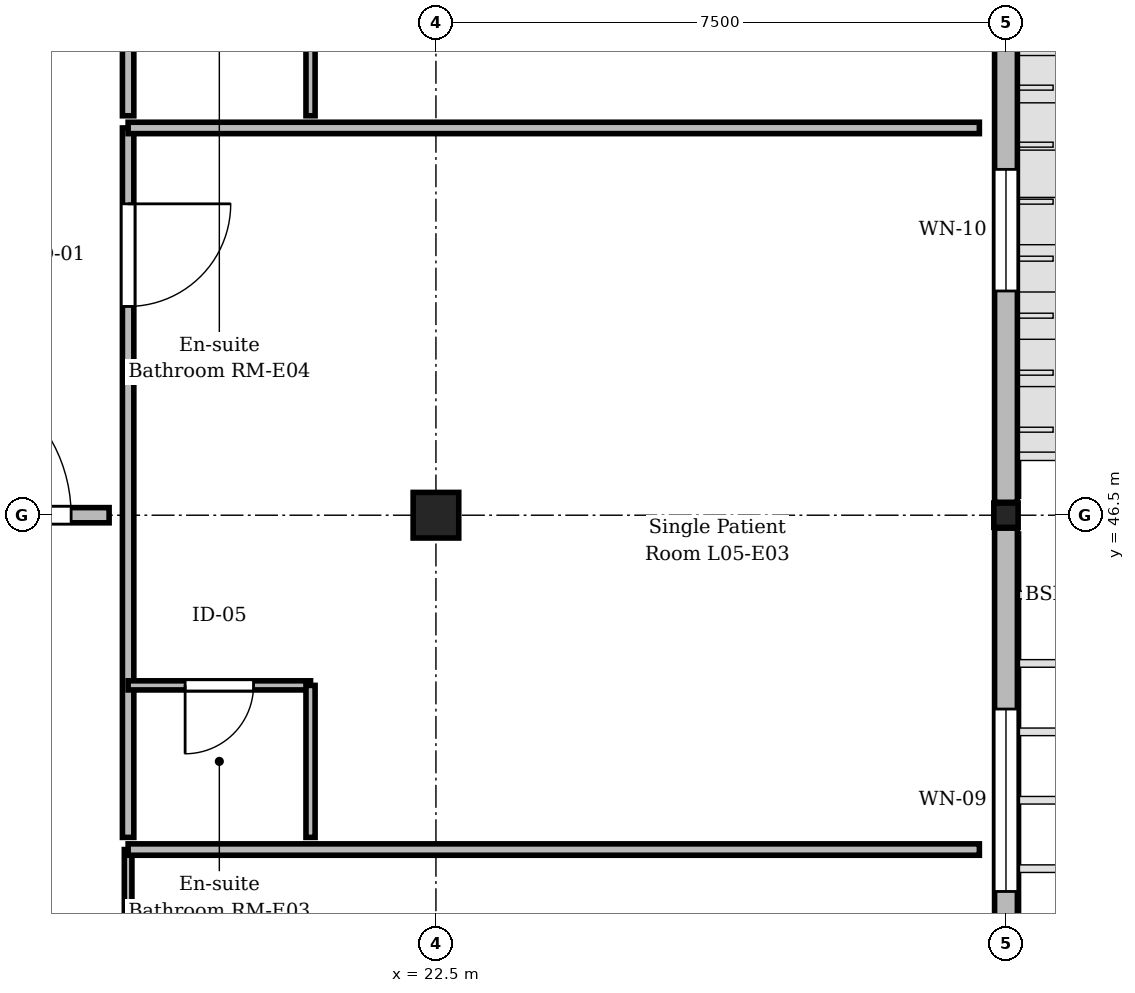
"""IFC4 building model, lengths in metres.
Left out: names, types, materials, properties, quantities, classifications, styles, units other than length and angle.
Written with IfcOpenShell. Run it as: python <this file> out.ifc"""

import sys

from ifc_helpers import new_model, si_unit, direction, frame, frame_2d, origin, origin_2d, place, context, subcontext, project, spatial, rectangle, circle, extrude, element, fill, save


model = new_model("IFC4")
c1 = context("Model", 3, precision=1e-05, world=origin(), true_north=direction((0.0, 1.0)))
c2 = subcontext(c1, "Body", "Model", "MODEL_VIEW")
j1 = project(units=[si_unit("LENGTHUNIT", "METRE"), si_unit("PLANEANGLEUNIT", "RADIAN")], contexts=[c1])
p1 = place(None, origin())
s1 = spatial("IfcSite", under=j1, at=p1, CompositionType="ELEMENT")
p2 = place(p1, origin())
s2 = spatial("IfcBuilding", under=s1, at=p2, CompositionType="ELEMENT")
p3 = place(p2, frame((0.0, 0.0, 21.9)))
s3 = spatial("IfcBuildingStorey", under=s2, at=p3, CompositionType="ELEMENT", Elevation=21.9)
p4 = place(p3, frame((22.5, 46.5, 0.0), z_axis=(0.0, 0.0, 1.0), x_axis=(1.0, 0.0, 0.0)))
e1 = element("IfcColumn", 1, at=p4, inside=s3, PredefinedType="COLUMN", context=c2, shape_type="SweptSolid", body=[
    extrude(circle(Radius=0.3, at=origin_2d()), origin(), (0.0, 0.0, 1.0), 4.05),
])
p5 = place(p3, frame((30.0, 46.5, 0.0), z_axis=(0.0, 0.0, 1.0), x_axis=(1.0, 0.0, 0.0)))
e2 = element("IfcColumn", 2, at=p5, inside=s3, PredefinedType="COLUMN", context=c2, shape_type="SweptSolid", body=[
    extrude(rectangle(XDim=0.32, YDim=0.32, at=origin_2d()), origin(), (0.0, 0.0, 1.0), 4.05),
])
p6 = place(p3, frame((30.0, 46.33, 0.0), z_axis=(0.0, 0.0, 1.0), x_axis=(0.0, -1.0, 0.0)))
e3 = element("IfcWall", 3, at=p6, inside=s3, PredefinedType="STANDARD", context=c2, shape_type="SweptSolid", body=[
    extrude(rectangle(XDim=7.16, YDim=0.3, at=frame_2d((3.58, 0.0))), origin(), (0.0, 0.0, 1.0), 3.17),
])
p7 = place(p6, frame((2.38, 0.0, 0.9)))
e4 = element("IfcOpeningElement", 4, at=p7, cuts=e3, PredefinedType="OPENING", context=c2, shape_type="SweptSolid", body=[
    extrude(rectangle(XDim=2.4, YDim=1.99, at=frame_2d((1.2, 0.995))), frame((0.0, 0.16, 0.0), z_axis=(0.0, -1.0, 0.0), x_axis=(1.0, 0.0, 0.0)), (0.0, 0.0, 1.0), 0.32),
])
p8 = place(p3, frame((30.0, 53.83, 0.0), z_axis=(0.0, 0.0, 1.0), x_axis=(0.0, -1.0, 0.0)))
e5 = element("IfcWall", 5, at=p8, inside=s3, PredefinedType="STANDARD", context=c2, shape_type="SweptSolid", body=[
    extrude(rectangle(XDim=7.16, YDim=0.3, at=frame_2d((3.58, 0.0))), origin(), (0.0, 0.0, 1.0), 3.17),
])
p9 = place(p8, frame((2.78, 0.0, 0.9)))
e6 = element("IfcOpeningElement", 6, at=p9, cuts=e5, PredefinedType="OPENING", context=c2, shape_type="SweptSolid", body=[
    extrude(rectangle(XDim=1.6, YDim=1.95, at=frame_2d((0.8, 0.975))), frame((0.0, 0.16, 0.0), z_axis=(0.0, -1.0, 0.0), x_axis=(1.0, 0.0, 0.0)), (0.0, 0.0, 1.0), 0.32),
])
p10 = place(p3, frame((18.45, 42.101, 0.0), z_axis=(0.0, 0.0, 1.0), x_axis=(0.0, -1.0, 0.0)))
e7 = element("IfcWall", 7, at=p10, inside=s3, PredefinedType="PARTITIONING", context=c2, shape_type="SweptSolid", body=[
    extrude(rectangle(XDim=9.334, YDim=0.1, at=frame_2d((4.667, 0.0))), origin(), (0.0, 0.0, 1.0), 3.755),
])
p11 = place(p10, frame((6.477, 0.0, 0.0)))
e8 = element("IfcOpeningElement", 8, at=p11, cuts=e7, PredefinedType="OPENING", context=c2, shape_type="SweptSolid", body=[
    extrude(rectangle(XDim=1.05, YDim=2.2, at=frame_2d((0.525, 1.1))), frame((0.0, 0.06, 0.0), z_axis=(0.0, -1.0, 0.0), x_axis=(1.0, 0.0, 0.0)), (0.0, 0.0, 1.0), 0.12),
])
p12 = place(p3, frame((18.45, 51.595, 0.0), z_axis=(0.0, 0.0, 1.0), x_axis=(0.0, -1.0, 0.0)))
e9 = element("IfcWall", 9, at=p12, inside=s3, PredefinedType="PARTITIONING", context=c2, shape_type="SweptSolid", body=[
    extrude(rectangle(XDim=9.334, YDim=0.15, at=frame_2d((4.667, 0.0))), origin(), (0.0, 0.0, 1.0), 3.755),
])
p13 = place(p12, frame((0.998, 0.0, 0.0)))
e10 = element("IfcOpeningElement", 10, at=p13, cuts=e9, PredefinedType="OPENING", context=c2, shape_type="SweptSolid", body=[
    extrude(rectangle(XDim=1.35, YDim=2.25, at=frame_2d((0.675, 1.125))), frame((0.0, 0.085, 0.0), z_axis=(0.0, -1.0, 0.0), x_axis=(1.0, 0.0, 0.0)), (0.0, 0.0, 1.0), 0.17),
])
p14 = place(p3, frame((20.85, 44.261, 0.0), z_axis=(0.0, 0.0, 1.0), x_axis=(-1.0, 0.0, 0.0)))
e11 = element("IfcWall", 11, at=p14, inside=s3, PredefinedType="PARTITIONING", context=c2, shape_type="SweptSolid", body=[
    extrude(rectangle(XDim=2.4, YDim=0.12, at=frame_2d((1.2, 0.0))), origin(), (0.0, 0.0, 1.0), 3.755),
])
p15 = place(p14, frame((0.75, 0.0, 0.0)))
e12 = element("IfcOpeningElement", 12, at=p15, cuts=e11, PredefinedType="OPENING", context=c2, shape_type="SweptSolid", body=[
    extrude(rectangle(XDim=0.9, YDim=2.1, at=frame_2d((0.45, 1.05))), frame((0.0, 0.07, 0.0), z_axis=(0.0, -1.0, 0.0), x_axis=(1.0, 0.0, 0.0)), (0.0, 0.0, 1.0), 0.14),
])
p16 = place(p3, frame((20.85, 42.261, 0.0), z_axis=(0.0, 0.0, 1.0), x_axis=(0.0, 1.0, 0.0)))
e13 = element("IfcWall", 13, at=p16, inside=s3, PredefinedType="PARTITIONING", context=c2, shape_type="SweptSolid", body=[
    extrude(rectangle(XDim=2.0, YDim=0.12, at=frame_2d((1.0, 0.0))), origin(), (0.0, 0.0, 1.0), 3.755),
])
p17 = place(p3, frame((18.45, 61.089, 0.0), z_axis=(0.0, 0.0, 1.0), x_axis=(0.0, -1.0, 0.0)))
e14 = element("IfcWall", 14, at=p17, inside=s3, PredefinedType="PARTITIONING", context=c2, shape_type="SweptSolid", body=[
    extrude(rectangle(XDim=9.334, YDim=0.15, at=frame_2d((4.667, 0.0))), origin(), (0.0, 0.0, 1.0), 3.755),
])
p18 = place(p17, frame((2.495, 0.0, 0.0)))
e15 = element("IfcOpeningElement", 15, at=p18, cuts=e14, PredefinedType="OPENING", context=c2, shape_type="SweptSolid", body=[
    extrude(rectangle(XDim=1.35, YDim=2.25, at=frame_2d((0.675, 1.125))), frame((0.0, 0.085, 0.0), z_axis=(0.0, -1.0, 0.0), x_axis=(1.0, 0.0, 0.0)), (0.0, 0.0, 1.0), 0.17),
])
p19 = place(p3, frame((20.85, 51.755, 0.0), z_axis=(0.0, 0.0, 1.0), x_axis=(0.0, 1.0, 0.0)))
e16 = element("IfcWall", 16, at=p19, inside=s3, PredefinedType="PARTITIONING", context=c2, shape_type="SweptSolid", body=[
    extrude(rectangle(XDim=2.0, YDim=0.12, at=frame_2d((1.0, 0.0))), origin(), (0.0, 0.0, 1.0), 3.755),
])
for number, where, z_axis, x_axis in (
    (17, (18.45, 42.101, 0.0), (0.0, 0.0, 1.0), (1.0, 0.0, 0.0)),
    (18, (18.45, 51.595, 0.0), (0.0, 0.0, 1.0), (1.0, 0.0, 0.0)),
):
    element("IfcWall", number, at=place(p3, frame(where, z_axis=z_axis, x_axis=x_axis)), inside=s3, PredefinedType="PARTITIONING", context=c2, shape_type="SweptSolid", body=[
        extrude(rectangle(XDim=11.2, YDim=0.15, at=frame_2d((5.6, 0.0))), origin(), (0.0, 0.0, 1.0), 3.755),
    ])
p20 = place(p3, frame((15.2, 46.5, 0.0), z_axis=(0.0, 0.0, 1.0), x_axis=(1.0, 0.0, 0.0)))
e19 = element("IfcWall", 19, at=p20, inside=s3, PredefinedType="STANDARD", context=c2, shape_type="SweptSolid", body=[
    extrude(rectangle(XDim=3.0, YDim=0.2, at=frame_2d((1.5, 0.0))), origin(), (0.0, 0.0, 1.0), 3.155),
])
p21 = place(p20, frame((0.5, 0.0, 0.0)))
e20 = element("IfcOpeningElement", 20, at=p21, cuts=e19, PredefinedType="OPENING", context=c2, shape_type="SweptSolid", body=[
    extrude(rectangle(XDim=2.0, YDim=2.3, at=frame_2d((1.0, 1.15))), frame((0.0, 0.11, 0.0), z_axis=(0.0, -1.0, 0.0), x_axis=(1.0, 0.0, 0.0)), (0.0, 0.0, 1.0), 0.22),
])
p22 = place(p7, origin())
e21 = element("IfcWindow", 21, at=p22, inside=s3, PartitioningType="SINGLE_PANEL", PredefinedType="WINDOW", context=c2, shape_type="SweptSolid", body=[
    extrude(rectangle(XDim=2.4, YDim=1.99, at=frame_2d((1.2, 0.995))), frame((0.0, 0.03, 0.0), z_axis=(0.0, -1.0, 0.0), x_axis=(1.0, 0.0, 0.0)), (0.0, 0.0, 1.0), 0.06),
])
fill(e4, e21)
p23 = place(p9, origin())
e22 = element("IfcWindow", 22, at=p23, inside=s3, PartitioningType="SINGLE_PANEL", PredefinedType="WINDOW", context=c2, shape_type="SweptSolid", body=[
    extrude(rectangle(XDim=1.6, YDim=1.95, at=frame_2d((0.8, 0.975))), frame((0.0, 0.03, 0.0), z_axis=(0.0, -1.0, 0.0), x_axis=(1.0, 0.0, 0.0)), (0.0, 0.0, 1.0), 0.06),
])
fill(e6, e22)
p24 = place(p13, origin())
e23 = element("IfcDoor", 23, at=p24, inside=s3, OperationType="SINGLE_SWING_LEFT", PredefinedType="DOOR", context=c2, shape_type="SweptSolid", body=[
    extrude(rectangle(XDim=1.35, YDim=2.25, at=frame_2d((0.675, 1.125))), frame((0.0, 0.025, 0.0), z_axis=(0.0, -1.0, 0.0), x_axis=(1.0, 0.0, 0.0)), (0.0, 0.0, 1.0), 0.05),
])
fill(e10, e23)
p25 = place(p15, origin())
e24 = element("IfcDoor", 24, at=p25, inside=s3, OperationType="SINGLE_SWING_RIGHT", PredefinedType="DOOR", context=c2, shape_type="SweptSolid", body=[
    extrude(rectangle(XDim=0.9, YDim=2.1, at=frame_2d((0.45, 1.05))), frame((0.0, 0.025, 0.0), z_axis=(0.0, -1.0, 0.0), x_axis=(1.0, 0.0, 0.0)), (0.0, 0.0, 1.0), 0.05),
])
fill(e12, e24)
p26 = place(p21, origin())
e25 = element("IfcDoor", 25, at=p26, inside=s3, OperationType="DOUBLE_DOOR_SINGLE_SWING", PredefinedType="DOOR", context=c2, shape_type="SweptSolid", body=[
    extrude(rectangle(XDim=2.0, YDim=2.3, at=frame_2d((1.0, 1.15))), frame((0.0, 0.025, 0.0), z_axis=(0.0, -1.0, 0.0), x_axis=(1.0, 0.0, 0.0)), (0.0, 0.0, 1.0), 0.05),
])
fill(e20, e25)
save(model, sys.argv[1])
